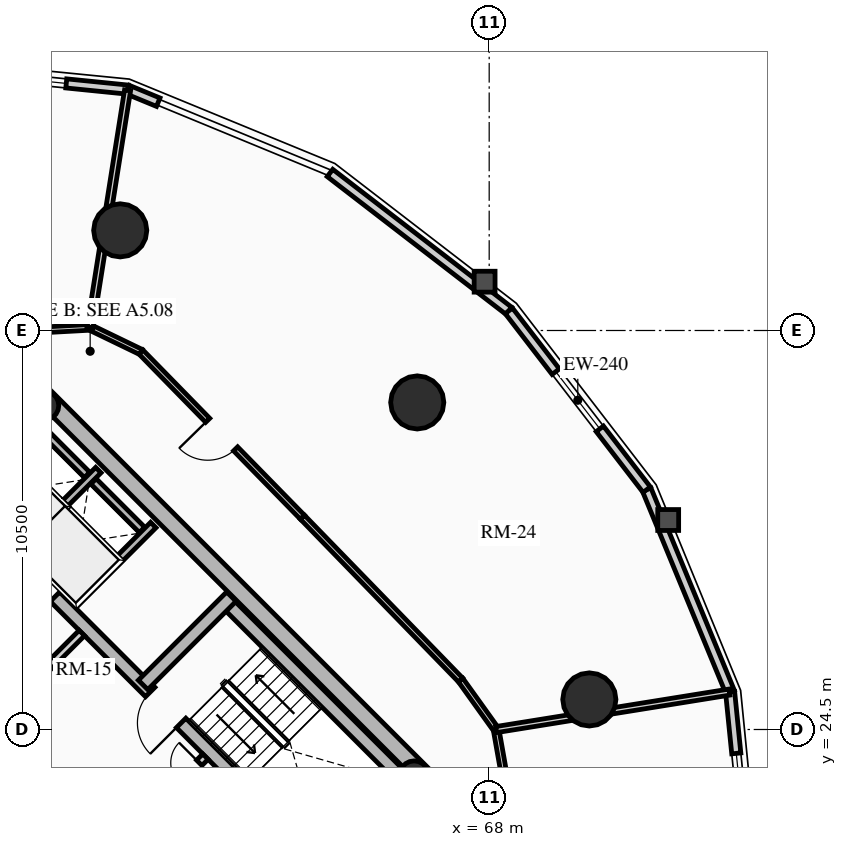
"""IFC4 building model, lengths in metres.
Left out: names, types, materials, properties, quantities, classifications, styles, units other than length and angle.
Written with IfcOpenShell. Run it as: python <this file> out.ifc"""

import sys

from ifc_helpers import new_model, si_unit, direction, frame, frame_2d, origin, origin_2d, place, context, subcontext, project, spatial, rectangle, circle, hollow_circle, extrude, source, transform, mapped, element, fill, save


model = new_model("IFC4")
c1 = context("Model", 3, precision=1e-05, world=origin(), true_north=direction((0.0, 1.0)))
c2 = subcontext(c1, "Body", "Model", "MODEL_VIEW")
j1 = project(units=[si_unit("LENGTHUNIT", "METRE"), si_unit("PLANEANGLEUNIT", "RADIAN")], contexts=[c1])
p1 = place(None, origin())
s1 = spatial("IfcSite", under=j1, at=p1, CompositionType="ELEMENT")
p2 = place(p1, origin())
s2 = spatial("IfcBuilding", under=s1, at=p2, CompositionType="ELEMENT")
p3 = place(p2, frame((0.0, 0.0, 73.06)))
s3 = spatial("IfcBuildingStorey", under=s2, at=p3, CompositionType="ELEMENT", Elevation=73.06)
for number, where, z_axis, x_axis in (
    (1, (58.737, 15.697, 0.0), (0.0, 0.0, 1.0), (-0.707, 0.707, 0.0)),
    (2, (66.303, 23.263, 0.0), (0.0, 0.0, 1.0), (-0.707, 0.707, 0.0)),
):
    element("IfcWall", number, at=place(p3, frame(where, z_axis=z_axis, x_axis=x_axis)), inside=s3, PredefinedType="SHEAR", context=c2, shape_type="SweptSolid", body=[
        extrude(rectangle(XDim=14.2, YDim=0.45, at=frame_2d((7.1, 0.0))), origin(), (0.0, 0.0, 1.0), 2.91),
    ])
p4 = place(p3, frame((58.578, 15.856, 0.0), z_axis=(0.0, 0.0, 1.0), x_axis=(0.707106781187, 0.707106781187, 0.0)))
e3 = element("IfcWall", 3, at=p4, inside=s3, PredefinedType="SHEAR", context=c2, shape_type="SweptSolid", body=[
    extrude(rectangle(XDim=10.7, YDim=0.45, at=frame_2d((5.35, 0.0))), origin(), (0.0, 0.0, 1.0), 2.91),
])
m1 = source(origin(), c2, "Body", "SweptSolid", [
    extrude(rectangle(XDim=1.5, YDim=2.02, at=frame_2d((0.75, 1.01))), frame((0.0, 0.235, 0.0), z_axis=(0.0, -1.0, 0.0), x_axis=(1.0, 0.0, 0.0)), (0.0, 0.0, 1.0), 0.47),
])
p5 = place(p4, frame((5.45, 0.0, 0.0)))
e4 = element("IfcOpeningElement", 4, at=p5, cuts=e3, PredefinedType="OPENING", context=c2, shape_type="MappedRepresentation", body=[
    mapped(m1, transform((0.0, 0.0, 0.0), x_axis=(1.0, 0.0, 0.0), y_axis=(0.0, 1.0, 0.0), z_axis=(0.0, 0.0, 1.0), scale=1.0)),
])
p6 = place(p3, frame((48.856, 25.578, 0.0), z_axis=(0.0, 0.0, 1.0), x_axis=(0.707106781187, 0.707106781187, 0.0)))
e5 = element("IfcWall", 5, at=p6, inside=s3, PredefinedType="SHEAR", context=c2, shape_type="SweptSolid", body=[
    extrude(rectangle(XDim=10.7, YDim=0.45, at=frame_2d((5.35, 0.0))), origin(), (0.0, 0.0, 1.0), 2.91),
])
p7 = place(p6, frame((4.6, 0.0, 0.0)))
e6 = element("IfcOpeningElement", 6, at=p7, cuts=e5, PredefinedType="OPENING", context=c2, shape_type="MappedRepresentation", body=[
    mapped(m1, transform((0.0, 0.0, 0.0), x_axis=(1.0, 0.0, 0.0), y_axis=(0.0, 1.0, 0.0), z_axis=(0.0, 0.0, 1.0), scale=1.0)),
])
p8 = place(p3, frame((61.078, 18.355, 0.0), z_axis=(0.0, 0.0, 1.0), x_axis=(-0.707106781187, 0.707106781187, 0.0)))
e7 = element("IfcWall", 7, at=p8, inside=s3, PredefinedType="SHEAR", context=c2, shape_type="SweptSolid", body=[
    extrude(rectangle(XDim=13.75, YDim=0.35, at=frame_2d((6.875, 0.0))), origin(), (0.0, 0.0, 1.0), 2.91),
])
m2 = source(origin(), c2, "Body", "SweptSolid", [
    extrude(rectangle(XDim=1.1, YDim=2.015, at=frame_2d((0.55, 1.007))), frame((0.0, 0.185, 0.0), z_axis=(0.0, -1.0, 0.0), x_axis=(1.0, 0.0, 0.0)), (0.0, 0.0, 1.0), 0.37),
])
p9 = place(p8, frame((4.875, 0.0, 0.0)))
e8 = element("IfcOpeningElement", 8, at=p9, cuts=e7, PredefinedType="OPENING", context=c2, shape_type="MappedRepresentation", body=[
    mapped(m2, transform((0.0, 0.0, 0.0), x_axis=(1.0, 0.0, 0.0), y_axis=(0.0, 1.0, 0.0), z_axis=(0.0, 0.0, 1.0), scale=1.0)),
])
m3 = source(origin(), c2, "Body", "SweptSolid", [
    extrude(rectangle(XDim=1.15, YDim=2.02, at=frame_2d((0.575, 1.01))), frame((0.0, 0.185, 0.0), z_axis=(0.0, -1.0, 0.0), x_axis=(1.0, 0.0, 0.0)), (0.0, 0.0, 1.0), 0.37),
])
p10 = place(p8, frame((7.295, 0.0, 0.0)))
e9 = element("IfcOpeningElement", 9, at=p10, cuts=e7, PredefinedType="OPENING", context=c2, shape_type="MappedRepresentation", body=[
    mapped(m3, transform((0.0, 0.0, 0.0), x_axis=(1.0, 0.0, 0.0), y_axis=(0.0, 1.0, 0.0), z_axis=(0.0, 0.0, 1.0), scale=1.0)),
])
p11 = place(p3, frame((63.645, 20.922, 0.0), z_axis=(0.0, 0.0, 1.0), x_axis=(-0.707106781187, 0.707106781187, 0.0)))
e10 = element("IfcWall", 10, at=p11, inside=s3, PredefinedType="SHEAR", context=c2, shape_type="SweptSolid", body=[
    extrude(rectangle(XDim=13.75, YDim=0.35, at=frame_2d((6.875, 0.0))), origin(), (0.0, 0.0, 1.0), 2.91),
])
p12 = place(p11, frame((10.0, 0.0, 0.0)))
e11 = element("IfcOpeningElement", 11, at=p12, cuts=e10, PredefinedType="OPENING", context=c2, shape_type="MappedRepresentation", body=[
    mapped(m2, transform((0.0, 0.0, 0.0), x_axis=(1.0, 0.0, 0.0), y_axis=(0.0, 1.0, 0.0), z_axis=(0.0, 0.0, 1.0), scale=1.0)),
])
p13 = place(p11, frame((12.0, 0.0, 0.0)))
e12 = element("IfcOpeningElement", 12, at=p13, cuts=e10, PredefinedType="OPENING", context=c2, shape_type="MappedRepresentation", body=[
    mapped(m2, transform((0.0, 0.0, 0.0), x_axis=(1.0, 0.0, 0.0), y_axis=(0.0, 1.0, 0.0), z_axis=(0.0, 0.0, 1.0), scale=1.0)),
])
p14 = place(p11, frame((5.305, 0.0, 0.0)))
e13 = element("IfcOpeningElement", 13, at=p14, cuts=e10, PredefinedType="OPENING", context=c2, shape_type="MappedRepresentation", body=[
    mapped(m3, transform((0.0, 0.0, 0.0), x_axis=(1.0, 0.0, 0.0), y_axis=(0.0, 1.0, 0.0), z_axis=(0.0, 0.0, 1.0), scale=1.0)),
])
p15 = place(p3, frame((65.83, 23.107, 0.0), z_axis=(0.0, 0.0, 1.0), x_axis=(-0.707088616009, 0.707124945897, 0.0)))
e14 = element("IfcWall", 14, at=p15, inside=s3, PredefinedType="SHEAR", context=c2, shape_type="SweptSolid", body=[
    extrude(rectangle(XDim=6.72, YDim=0.35, at=frame_2d((3.36, 0.0))), origin(), (0.0, 0.0, 1.0), 2.91),
])
p16 = place(p3, frame((58.893, 25.674, 0.0), z_axis=(0.0, 0.0, 1.0), x_axis=(0.707106781187, 0.707106781187, 0.0)))
e15 = element("IfcWall", 15, at=p16, inside=s3, PredefinedType="SHEAR", context=c2, shape_type="SweptSolid", body=[
    extrude(rectangle(XDim=3.285, YDim=0.35, at=frame_2d((1.643, 0.0))), origin(), (0.0, 0.0, 1.0), 2.91),
])
for number, where, z_axis, x_axis in (
    (16, (66.024, 23.294, 0.0), (0.0, 0.0, 1.0), (0.707, 0.707, 0.0)),
    (17, (56.294, 33.024, 0.0), (0.0, 0.0, 1.0), (0.707, 0.707, 0.0)),
):
    element("IfcColumn", number, at=place(p3, frame(where, z_axis=z_axis, x_axis=x_axis)), inside=s3, PredefinedType="COLUMN", context=c2, shape_type="SweptSolid", body=[
        extrude(hollow_circle(Radius=0.38, WallThickness=0.032, at=origin_2d()), origin(), (0.0, 0.0, 1.0), 2.91),
    ])
for number, where, z_axis, x_axis in (
    (18, (66.107, 33.107, 0.0), (0.0, 0.0, 1.0), (1.0, 0.0, 0.0)),
    (19, (58.291, 37.635, 0.0), (0.0, 0.0, 1.0), (1.0, 0.0, 0.0)),
    (20, (70.635, 25.291, 0.0), (0.0, 0.0, 1.0), (1.0, 0.0, 0.0)),
):
    element("IfcColumn", number, at=place(p3, frame(where, z_axis=z_axis, x_axis=x_axis)), inside=s3, PredefinedType="USERDEFINED", context=c2, shape_type="SweptSolid", body=[
        extrude(circle(Radius=0.7, at=origin_2d()), origin(), (0.0, 0.0, 1.0), 2.91),
    ])
p17 = place(p3, frame((63.811, 39.145, 0.0), z_axis=(0.0, 0.0, 1.0), x_axis=(0.791982052206, -0.61054437102, 0.0)))
e21 = element("IfcWall", 21, at=p17, inside=s3, PredefinedType="SOLIDWALL", context=c2, shape_type="SweptSolid", body=[
    extrude(rectangle(XDim=5.942, YDim=0.24, at=frame_2d((2.971, 0.0))), origin(), (0.0, 0.0, 1.0), 2.179),
])
p18 = place(p3, frame((58.487, 41.339, 0.0), z_axis=(0.0, 0.0, 1.0), x_axis=(0.924556017656, -0.381046152345, 0.0)))
e22 = element("IfcWall", 22, at=p18, inside=s3, PredefinedType="SOLIDWALL", context=c2, shape_type="SweptSolid", body=[
    extrude(rectangle(XDim=0.87, YDim=0.24, at=frame_2d((0.435, 0.0))), origin(), (0.0, 0.0, 1.0), 2.179),
])
p19 = place(p3, frame((53.067, 41.885, 0.0), z_axis=(0.0, 0.0, 1.0), x_axis=(0.994971754311, -0.10015591906, 0.0)))
e23 = element("IfcWall", 23, at=p19, inside=s3, PredefinedType="SOLIDWALL", context=c2, shape_type="SweptSolid", body=[
    extrude(rectangle(XDim=5.448, YDim=0.24, at=frame_2d((2.724, 0.0))), origin(), (0.0, 0.0, 1.0), 2.179),
])
m4 = source(origin(), c2, "Body", "SweptSolid", [
    extrude(rectangle(XDim=2.2, YDim=1.35, at=frame_2d((1.1, 0.675))), frame((0.0, 0.13, 0.0), z_axis=(0.0, -1.0, 0.0), x_axis=(1.0, 0.0, 0.0)), (0.0, 0.0, 1.0), 0.26),
])
p20 = place(p19, frame((1.624, 0.0, 0.65)))
e24 = element("IfcOpeningElement", 24, at=p20, cuts=e23, PredefinedType="OPENING", context=c2, shape_type="MappedRepresentation", body=[
    mapped(m4, transform((0.0, 0.0, 0.0), x_axis=(1.0, 0.0, 0.0), y_axis=(0.0, 1.0, 0.0), z_axis=(0.0, 0.0, 1.0), scale=1.0)),
])
p21 = place(p3, frame((74.339, 25.487, 0.0), z_axis=(0.0, 0.0, 1.0), x_axis=(0.10015591906, -0.994971754311, 0.0)))
e25 = element("IfcWall", 25, at=p21, inside=s3, PredefinedType="SOLIDWALL", context=c2, shape_type="SweptSolid", body=[
    extrude(rectangle(XDim=5.448, YDim=0.24, at=frame_2d((2.724, 0.0))), origin(), (0.0, 0.0, 1.0), 2.179),
])
p22 = place(p21, frame((1.624, 0.0, 0.65)))
e26 = element("IfcOpeningElement", 26, at=p22, cuts=e25, PredefinedType="OPENING", context=c2, shape_type="MappedRepresentation", body=[
    mapped(m4, transform((0.0, 0.0, 0.0), x_axis=(1.0, 0.0, 0.0), y_axis=(0.0, 1.0, 0.0), z_axis=(0.0, 0.0, 1.0), scale=1.0)),
])
p23 = place(p3, frame((72.145, 30.811, 0.0), z_axis=(0.0, 0.0, 1.0), x_axis=(0.381027003055, -0.924563909604, 0.0)))
e27 = element("IfcWall", 27, at=p23, inside=s3, PredefinedType="SOLIDWALL", context=c2, shape_type="SweptSolid", body=[
    extrude(rectangle(XDim=5.758, YDim=0.24, at=frame_2d((2.879, 0.0))), origin(), (0.0, 0.0, 1.0), 2.179),
])
p24 = place(p3, frame((68.517, 35.517, 0.0), z_axis=(0.0, 0.0, 1.0), x_axis=(0.61054437102, -0.791982052206, 0.0)))
e28 = element("IfcWall", 28, at=p24, inside=s3, PredefinedType="SOLIDWALL", context=c2, shape_type="SweptSolid", body=[
    extrude(rectangle(XDim=5.942, YDim=0.24, at=frame_2d((2.971, 0.0))), origin(), (0.0, 0.0, 1.0), 2.179),
])
m5 = source(origin(), c2, "Body", "SweptSolid", [
    extrude(rectangle(XDim=1.9, YDim=1.35, at=frame_2d((0.95, 0.675))), frame((0.0, 0.13, 0.0), z_axis=(0.0, -1.0, 0.0), x_axis=(1.0, 0.0, 0.0)), (0.0, 0.0, 1.0), 0.26),
])
p25 = place(p24, frame((2.021, 0.0, 0.65)))
e29 = element("IfcOpeningElement", 29, at=p25, cuts=e28, PredefinedType="OPENING", context=c2, shape_type="MappedRepresentation", body=[
    mapped(m5, transform((0.0, 0.0, 0.0), x_axis=(1.0, 0.0, 0.0), y_axis=(0.0, 1.0, 0.0), z_axis=(0.0, 0.0, 1.0), scale=1.0)),
])
p26 = place(p3, frame((57.062, 27.781, 0.0), z_axis=(0.0, 0.0, 1.0), x_axis=(0.707106781187, 0.707106781187, 0.0)))
e30 = element("IfcWall", 30, at=p26, inside=s3, PredefinedType="SHEAR", context=c2, shape_type="SweptSolid", body=[
    extrude(rectangle(XDim=2.97, YDim=0.2, at=frame_2d((1.485, 0.0))), origin(), (0.0, 0.0, 1.0), 2.91),
])
p27 = place(p3, frame((55.615, 29.227, 0.0), z_axis=(0.0, 0.0, 1.0), x_axis=(0.707147878904, 0.70706568108, 0.0)))
e31 = element("IfcWall", 31, at=p27, inside=s3, PredefinedType="SHEAR", context=c2, shape_type="SweptSolid", body=[
    extrude(rectangle(XDim=2.97, YDim=0.2, at=frame_2d((1.485, 0.0))), origin(), (0.0, 0.0, 1.0), 2.91),
])
p28 = place(p3, frame((58.865, 29.754, 0.0), z_axis=(0.0, 0.0, 1.0), x_axis=(-0.707174411312, 0.707039144592, 0.0)))
e32 = element("IfcWall", 32, at=p28, inside=s3, PredefinedType="SHEAR", context=c2, shape_type="SweptSolid", body=[
    extrude(rectangle(XDim=1.805, YDim=0.2, at=frame_2d((0.902, 0.0))), origin(), (0.0, 0.0, 1.0), 2.91),
])
p29 = place(p3, frame((57.419, 31.2, 0.0), z_axis=(0.0, 0.0, 1.0), x_axis=(-0.707032117043, 0.707181437447, 0.0)))
e33 = element("IfcWall", 33, at=p29, inside=s3, PredefinedType="SHEAR", context=c2, shape_type="SweptSolid", body=[
    extrude(rectangle(XDim=1.635, YDim=0.2, at=frame_2d((0.817, 0.0))), origin(), (0.0, 0.0, 1.0), 2.91),
])
p30 = place(p3, frame((58.214, 21.467, 0.0), z_axis=(0.0, 0.0, 1.0), x_axis=(0.707106781187, 0.707106781187, 0.0)))
e34 = element("IfcWall", 34, at=p30, inside=s3, PredefinedType="PARTITIONING", context=c2, shape_type="SweptSolid", body=[
    extrude(rectangle(XDim=3.28, YDim=0.2, at=frame_2d((1.64, 0.0))), origin(), (0.0, 0.0, 1.0), 2.655),
])
m6 = source(origin(), c2, "Body", "SweptSolid", [
    extrude(rectangle(XDim=1.5, YDim=2.02, at=frame_2d((0.75, 1.01))), frame((0.0, 0.11, 0.0), z_axis=(0.0, -1.0, 0.0), x_axis=(1.0, 0.0, 0.0)), (0.0, 0.0, 1.0), 0.22),
])
p31 = place(p30, frame((1.55, 0.0, 0.0)))
e35 = element("IfcOpeningElement", 35, at=p31, cuts=e34, PredefinedType="OPENING", context=c2, shape_type="MappedRepresentation", body=[
    mapped(m6, transform((0.0, 0.0, 0.0), x_axis=(1.0, 0.0, 0.0), y_axis=(0.0, 1.0, 0.0), z_axis=(0.0, 0.0, 1.0), scale=1.0)),
])
p32 = place(p3, frame((54.961, 24.719, 0.0), z_axis=(0.0, 0.0, 1.0), x_axis=(0.707106781187, 0.707106781187, 0.0)))
e36 = element("IfcWall", 36, at=p32, inside=s3, PredefinedType="PARTITIONING", context=c2, shape_type="SweptSolid", body=[
    extrude(rectangle(XDim=3.28, YDim=0.2, at=frame_2d((1.64, 0.0))), origin(), (0.0, 0.0, 1.0), 2.655),
])
m7 = source(origin(), c2, "Body", "SweptSolid", [
    extrude(rectangle(XDim=0.9, YDim=2.005, at=frame_2d((0.45, 1.002))), frame((0.0, 0.11, 0.0), z_axis=(0.0, -1.0, 0.0), x_axis=(1.0, 0.0, 0.0)), (0.0, 0.0, 1.0), 0.22),
])
p33 = place(p32, frame((0.16, 0.0, 0.0)))
e37 = element("IfcOpeningElement", 37, at=p33, cuts=e36, PredefinedType="OPENING", context=c2, shape_type="MappedRepresentation", body=[
    mapped(m7, transform((0.0, 0.0, 0.0), x_axis=(1.0, 0.0, 0.0), y_axis=(0.0, 1.0, 0.0), z_axis=(0.0, 0.0, 1.0), scale=1.0)),
])
p34 = place(p3, frame((63.086, 30.086, 0.0), z_axis=(0.0, 0.0, 1.0), x_axis=(-0.699032802832, 0.715089603172, 0.0)))
e38 = element("IfcWall", 38, at=p34, inside=s3, PredefinedType="PARTITIONING", context=c2, shape_type="SweptSolid", body=[
    extrude(rectangle(XDim=6.082, YDim=0.15, at=frame_2d((3.041, 0.0))), origin(), (0.0, 0.0, 1.0), 2.225),
])
m8 = source(origin(), c2, "Body", "SweptSolid", [
    extrude(rectangle(XDim=1.05, YDim=2.015, at=frame_2d((0.525, 1.007))), frame((0.0, 0.085, 0.0), z_axis=(0.0, -1.0, 0.0), x_axis=(1.0, 0.0, 0.0)), (0.0, 0.0, 1.0), 0.17),
])
p35 = place(p34, frame((2.516, 0.0, 0.0)))
e39 = element("IfcOpeningElement", 39, at=p35, cuts=e38, PredefinedType="OPENING", context=c2, shape_type="MappedRepresentation", body=[
    mapped(m8, transform((0.0, 0.0, 0.0), x_axis=(1.0, 0.0, 0.0), y_axis=(0.0, 1.0, 0.0), z_axis=(0.0, 0.0, 1.0), scale=1.0)),
])
p36 = place(p3, frame((58.835, 34.435, 0.0), z_axis=(0.0, 0.0, 1.0), x_axis=(-0.900352167336, 0.4351620098, 0.0)))
e40 = element("IfcWall", 40, at=p36, inside=s3, PredefinedType="PARTITIONING", context=c2, shape_type="SweptSolid", body=[
    extrude(rectangle(XDim=1.488, YDim=0.15, at=frame_2d((0.744, 0.0))), origin(), (0.0, 0.0, 1.0), 2.225),
])
p37 = place(p3, frame((57.495, 35.083, 0.0), z_axis=(0.0, 0.0, 1.0), x_axis=(-0.998536503254, -0.054081897798, 0.0)))
e41 = element("IfcWall", 41, at=p37, inside=s3, PredefinedType="PARTITIONING", context=c2, shape_type="SweptSolid", body=[
    extrude(rectangle(XDim=1.481, YDim=0.15, at=frame_2d((0.74, 0.0))), origin(), (0.0, 0.0, 1.0), 2.225),
])
p38 = place(p3, frame((68.423, 23.142, 0.0), z_axis=(0.0, 0.0, 1.0), x_axis=(-0.174796562349, 0.984604571283, 0.0)))
e42 = element("IfcWall", 42, at=p38, inside=s3, PredefinedType="PARTITIONING", context=c2, shape_type="SweptSolid", body=[
    extrude(rectangle(XDim=1.377, YDim=0.15, at=frame_2d((0.688, 0.0))), origin(), (0.0, 0.0, 1.0), 2.225),
])
p39 = place(p3, frame((68.182, 24.498, 0.0), z_axis=(0.0, 0.0, 1.0), x_axis=(-0.582532339525, 0.812807525437, 0.0)))
e43 = element("IfcWall", 43, at=p39, inside=s3, PredefinedType="PARTITIONING", context=c2, shape_type="SweptSolid", body=[
    extrude(rectangle(XDim=1.605, YDim=0.15, at=frame_2d((0.803, 0.0))), origin(), (0.0, 0.0, 1.0), 2.225),
])
p40 = place(p3, frame((67.247, 25.802, 0.0), z_axis=(0.0, 0.0, 1.0), x_axis=(-0.696771261687, 0.71729339108, 0.0)))
e44 = element("IfcWall", 44, at=p40, inside=s3, PredefinedType="PARTITIONING", context=c2, shape_type="SweptSolid", body=[
    extrude(rectangle(XDim=5.972, YDim=0.15, at=frame_2d((2.986, 0.0))), origin(), (0.0, 0.0, 1.0), 2.655),
])
p41 = place(p3, frame((57.495, 35.083, 0.0), z_axis=(0.0, 0.0, 1.0), x_axis=(0.156619688156, 0.987658986332, 0.0)))
e45 = element("IfcWall", 45, at=p41, inside=s3, PredefinedType="PARTITIONING", context=c2, shape_type="SweptSolid", body=[
    extrude(rectangle(XDim=6.315, YDim=0.16, at=frame_2d((3.157, 0.0))), origin(), (0.0, 0.0, 1.0), 2.179),
])
p42 = place(p3, frame((68.182, 24.498, 0.0), z_axis=(0.0, 0.0, 1.0), x_axis=(0.987330591038, 0.158676727973, 0.0)))
e46 = element("IfcWall", 46, at=p42, inside=s3, PredefinedType="PARTITIONING", context=c2, shape_type="SweptSolid", body=[
    extrude(rectangle(XDim=6.216, YDim=0.16, at=frame_2d((3.108, 0.0))), origin(), (0.0, 0.0, 1.0), 2.179),
])
m9 = source(origin(), c2, "Body", "SweptSolid", [
    extrude(rectangle(XDim=2.2, YDim=1.35, at=frame_2d((1.1, 0.675))), frame((0.0, 0.03, 0.0), z_axis=(0.0, -1.0, 0.0), x_axis=(1.0, 0.0, 0.0)), (0.0, 0.0, 1.0), 0.06),
])
p43 = place(p20, origin())
e47 = element("IfcWindow", 47, at=p43, inside=s3, PartitioningType="DOUBLE_PANEL_VERTICAL", PredefinedType="WINDOW", context=c2, shape_type="MappedRepresentation", body=[
    mapped(m9, transform((0.0, 0.0, 0.0), x_axis=(1.0, 0.0, 0.0), y_axis=(0.0, 1.0, 0.0), z_axis=(0.0, 0.0, 1.0), scale=1.0)),
])
fill(e24, e47)
p44 = place(p22, origin())
e48 = element("IfcWindow", 48, at=p44, inside=s3, PartitioningType="DOUBLE_PANEL_VERTICAL", PredefinedType="WINDOW", context=c2, shape_type="MappedRepresentation", body=[
    mapped(m9, transform((0.0, 0.0, 0.0), x_axis=(1.0, 0.0, 0.0), y_axis=(0.0, 1.0, 0.0), z_axis=(0.0, 0.0, 1.0), scale=1.0)),
])
fill(e26, e48)
m10 = source(origin(), c2, "Body", "SweptSolid", [
    extrude(rectangle(XDim=1.9, YDim=1.35, at=frame_2d((0.95, 0.675))), frame((0.0, 0.03, 0.0), z_axis=(0.0, -1.0, 0.0), x_axis=(1.0, 0.0, 0.0)), (0.0, 0.0, 1.0), 0.06),
])
p45 = place(p25, origin())
e49 = element("IfcWindow", 49, at=p45, inside=s3, PartitioningType="DOUBLE_PANEL_VERTICAL", PredefinedType="WINDOW", context=c2, shape_type="MappedRepresentation", body=[
    mapped(m10, transform((0.0, 0.0, 0.0), x_axis=(1.0, 0.0, 0.0), y_axis=(0.0, 1.0, 0.0), z_axis=(0.0, 0.0, 1.0), scale=1.0)),
])
fill(e29, e49)
m11 = source(origin(), c2, "Body", "SweptSolid", [
    extrude(rectangle(XDim=1.1, YDim=2.015, at=frame_2d((0.55, 1.007))), frame((0.0, 0.025, 0.0), z_axis=(0.0, -1.0, 0.0), x_axis=(1.0, 0.0, 0.0)), (0.0, 0.0, 1.0), 0.05),
])
p46 = place(p12, origin())
e50 = element("IfcDoor", 50, at=p46, inside=s3, OperationType="SLIDING_TO_RIGHT", PredefinedType="DOOR", context=c2, shape_type="MappedRepresentation", body=[
    mapped(m11, transform((0.0, 0.0, 0.0), x_axis=(1.0, 0.0, 0.0), y_axis=(0.0, 1.0, 0.0), z_axis=(0.0, 0.0, 1.0), scale=1.0)),
])
fill(e11, e50)
m12 = source(origin(), c2, "Body", "SweptSolid", [
    extrude(rectangle(XDim=1.15, YDim=2.02, at=frame_2d((0.575, 1.01))), frame((0.0, 0.025, 0.0), z_axis=(0.0, -1.0, 0.0), x_axis=(1.0, 0.0, 0.0)), (0.0, 0.0, 1.0), 0.05),
])
p47 = place(p14, origin())
e51 = element("IfcDoor", 51, at=p47, inside=s3, OperationType="SINGLE_SWING_LEFT", PredefinedType="DOOR", context=c2, shape_type="MappedRepresentation", body=[
    mapped(m12, transform((0.0, 0.0, 0.0), x_axis=(1.0, 0.0, 0.0), y_axis=(0.0, 1.0, 0.0), z_axis=(0.0, 0.0, 1.0), scale=1.0)),
])
fill(e13, e51)
m13 = source(origin(), c2, "Body", "SweptSolid", [
    extrude(rectangle(XDim=1.5, YDim=2.02, at=frame_2d((0.75, 1.01))), frame((0.0, 0.025, 0.0), z_axis=(0.0, -1.0, 0.0), x_axis=(1.0, 0.0, 0.0)), (0.0, 0.0, 1.0), 0.05),
])
p48 = place(p31, origin())
e52 = element("IfcDoor", 52, at=p48, inside=s3, OperationType="DOUBLE_DOOR_SINGLE_SWING", PredefinedType="DOOR", context=c2, shape_type="MappedRepresentation", body=[
    mapped(m13, transform((0.0, 0.0, 0.0), x_axis=(1.0, 0.0, 0.0), y_axis=(0.0, 1.0, 0.0), z_axis=(0.0, 0.0, 1.0), scale=1.0)),
])
fill(e35, e52)
m14 = source(origin(), c2, "Body", "SweptSolid", [
    extrude(rectangle(XDim=1.05, YDim=2.015, at=frame_2d((0.525, 1.007))), frame((0.0, 0.025, 0.0), z_axis=(0.0, -1.0, 0.0), x_axis=(1.0, 0.0, 0.0)), (0.0, 0.0, 1.0), 0.05),
])
p49 = place(p35, origin())
e53 = element("IfcDoor", 53, at=p49, inside=s3, OperationType="SINGLE_SWING_RIGHT", PredefinedType="DOOR", context=c2, shape_type="MappedRepresentation", body=[
    mapped(m14, transform((0.0, 0.0, 0.0), x_axis=(1.0, 0.0, 0.0), y_axis=(0.0, 1.0, 0.0), z_axis=(0.0, 0.0, 1.0), scale=1.0)),
])
fill(e39, e53)
save(model, sys.argv[1])
